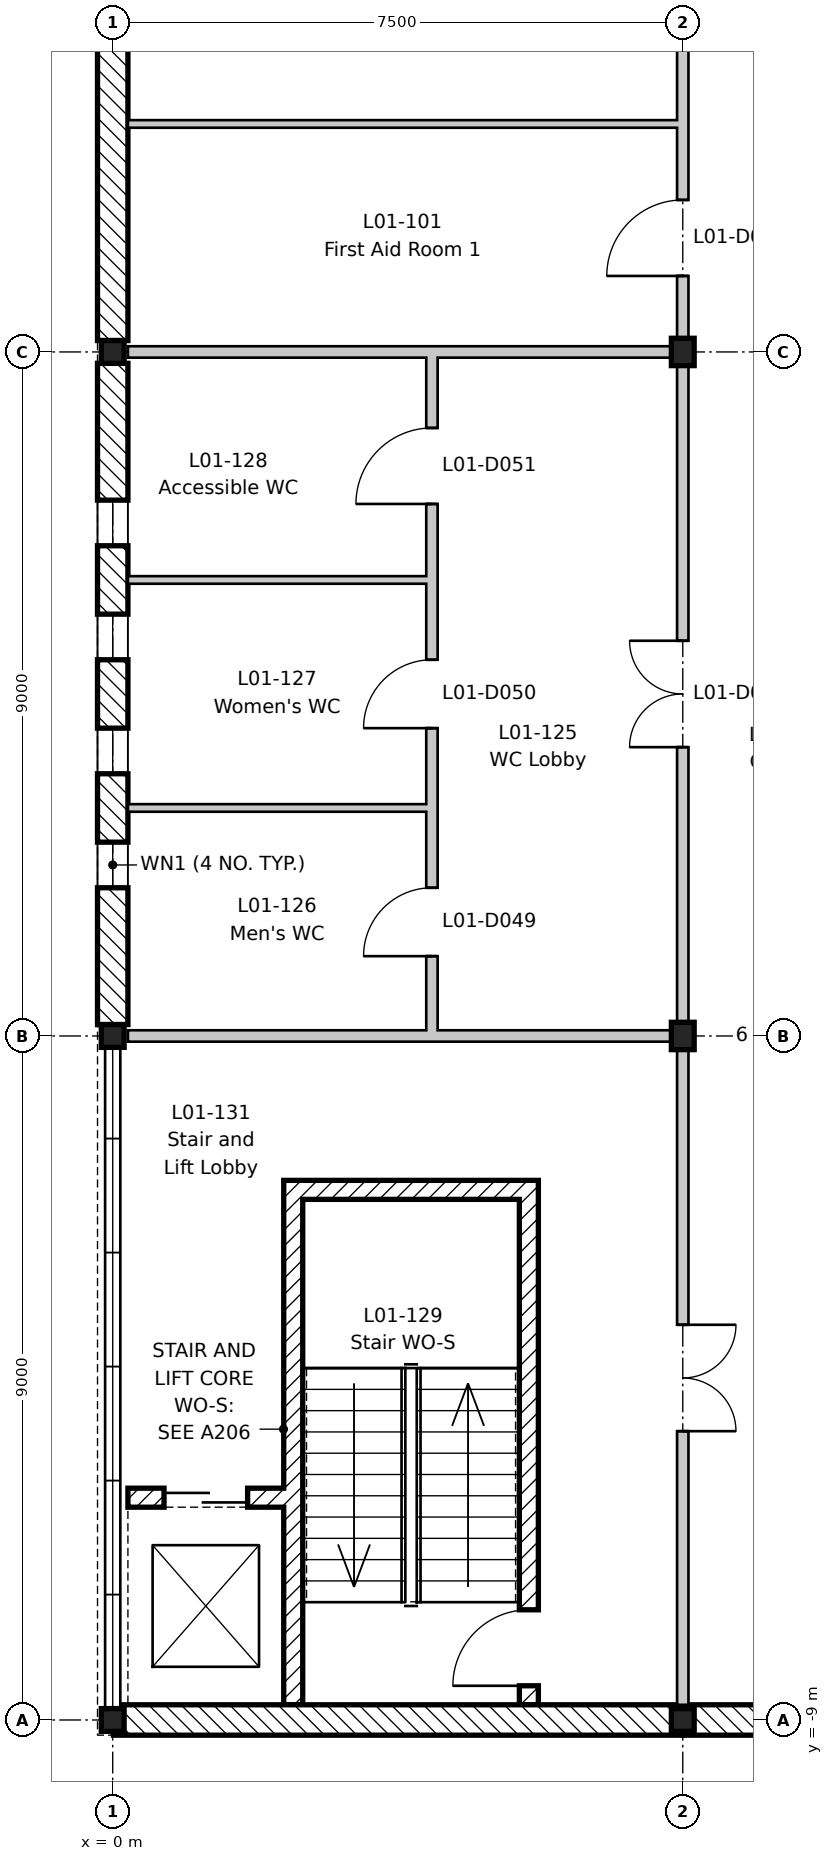
"""IFC4 building model, lengths in metres.
Left out: names, types, materials, properties, quantities, classifications, styles, units other than length and angle.
Written with IfcOpenShell. Run it as: python <this file> out.ifc"""

import sys

from ifc_helpers import new_model, si_unit, direction, frame, frame_2d, origin, origin_2d, place, context, subcontext, project, spatial, rectangle, i_section, extrude, element, fill, save


model = new_model("IFC4")
c1 = context("Model", 3, precision=1e-05, world=origin(), true_north=direction((0.0, 1.0)))
c2 = subcontext(c1, "Body", "Model", "MODEL_VIEW")
j1 = project(units=[si_unit("LENGTHUNIT", "METRE"), si_unit("PLANEANGLEUNIT", "RADIAN")], contexts=[c1])
p1 = place(None, origin())
s1 = spatial("IfcSite", under=j1, at=p1, CompositionType="ELEMENT")
p2 = place(p1, origin())
s2 = spatial("IfcBuilding", under=s1, at=p2, CompositionType="ELEMENT")
p3 = place(p2, frame((0.0, 0.0, 5.4)))
s3 = spatial("IfcBuildingStorey", under=s2, at=p3, CompositionType="ELEMENT", Elevation=5.4)
for number, where, z_axis, x_axis in (
    (1, (0.0, -9.0, -0.2), (0.0, 0.0, 1.0), (1.0, 0.0, 0.0)),
    (2, (0.0, 0.0, -0.2), (0.0, 0.0, 1.0), (1.0, 0.0, 0.0)),
    (3, (0.0, 9.0, -0.2), (0.0, 0.0, 1.0), (1.0, 0.0, 0.0)),
    (4, (7.5, -9.0, -0.2), (0.0, 0.0, 1.0), (1.0, 0.0, 0.0)),
):
    element("IfcColumn", number, at=place(p3, frame(where, z_axis=z_axis, x_axis=x_axis)), inside=s3, PredefinedType="COLUMN", context=c2, shape_type="SweptSolid", body=[
        extrude(i_section(OverallWidth=0.3, OverallDepth=0.3, WebThickness=0.011, FlangeThickness=0.019, FilletRadius=0.027, at=origin_2d()), origin(), (0.0, 0.0, 1.0), 4.5),
    ])
for number, where, z_axis, x_axis in (
    (5, (7.5, 0.0, -0.2), (0.0, 0.0, 1.0), (1.0, 0.0, 0.0)),
    (6, (7.5, 9.0, -0.2), (0.0, 0.0, 1.0), (1.0, 0.0, 0.0)),
):
    element("IfcColumn", number, at=place(p3, frame(where, z_axis=z_axis, x_axis=x_axis)), inside=s3, PredefinedType="COLUMN", context=c2, shape_type="SweptSolid", body=[
        extrude(i_section(OverallWidth=0.3, OverallDepth=0.36, WebThickness=0.012, FlangeThickness=0.022, FilletRadius=0.027, at=origin_2d()), origin(), (0.0, 0.0, 1.0), 4.5),
    ])
p4 = place(p3, frame((2.375, -8.8, 0.0), z_axis=(0.0, 0.0, 1.0), x_axis=(0.0, 1.0, 0.0)))
e7 = element("IfcWall", 7, at=p4, inside=s3, PredefinedType="SHEAR", context=c2, shape_type="SweptSolid", body=[
    extrude(rectangle(XDim=6.9, YDim=0.25, at=frame_2d((3.45, 0.0))), origin(), (0.0, 0.0, 1.0), 4.3),
])
p5 = place(p3, frame((5.475, -8.8, 0.0), z_axis=(0.0, 0.0, 1.0), x_axis=(0.0, 1.0, 0.0)))
e8 = element("IfcWall", 8, at=p5, inside=s3, PredefinedType="SHEAR", context=c2, shape_type="SweptSolid", body=[
    extrude(rectangle(XDim=6.9, YDim=0.25, at=frame_2d((3.45, 0.0))), origin(), (0.0, 0.0, 1.0), 4.3),
])
p6 = place(p5, frame((0.25, 0.0, 0.0)))
e9 = element("IfcOpeningElement", 9, at=p6, cuts=e8, PredefinedType="OPENING", context=c2, shape_type="SweptSolid", body=[
    extrude(rectangle(XDim=1.0, YDim=2.1, at=frame_2d((0.5, 1.05))), frame((0.0, 0.135, 0.0), z_axis=(0.0, -1.0, 0.0), x_axis=(1.0, 0.0, 0.0)), (0.0, 0.0, 1.0), 0.27),
])
p7 = place(p3, frame((2.5, -2.025, 0.0), z_axis=(0.0, 0.0, 1.0), x_axis=(1.0, 0.0, 0.0)))
e10 = element("IfcWall", 10, at=p7, inside=s3, PredefinedType="SHEAR", context=c2, shape_type="SweptSolid", body=[
    extrude(rectangle(XDim=2.85, YDim=0.25, at=frame_2d((1.425, 0.0))), origin(), (0.0, 0.0, 1.0), 4.3),
])
p8 = place(p3, frame((0.2, -6.075, 0.0), z_axis=(0.0, 0.0, 1.0), x_axis=(1.0, 0.0, 0.0)))
e11 = element("IfcWall", 11, at=p8, inside=s3, PredefinedType="SHEAR", context=c2, shape_type="SweptSolid", body=[
    extrude(rectangle(XDim=2.05, YDim=0.25, at=frame_2d((1.025, 0.0))), origin(), (0.0, 0.0, 1.0), 4.3),
])
p9 = place(p8, frame((0.475, 0.0, 0.0)))
e12 = element("IfcOpeningElement", 12, at=p9, cuts=e11, PredefinedType="OPENING", context=c2, shape_type="SweptSolid", body=[
    extrude(rectangle(XDim=1.1, YDim=2.1, at=frame_2d((0.55, 1.05))), frame((0.0, 0.135, 0.0), z_axis=(0.0, -1.0, 0.0), x_axis=(1.0, 0.0, 0.0)), (0.0, 0.0, 1.0), 0.27),
])
p10 = place(p3, frame((0.0, 0.15, 0.0), z_axis=(0.0, 0.0, 1.0), x_axis=(0.0, 1.0, 0.0)))
e13 = element("IfcWall", 13, at=p10, inside=s3, PredefinedType="STANDARD", context=c2, shape_type="SweptSolid", body=[
    extrude(rectangle(XDim=8.7, YDim=0.4, at=frame_2d((4.35, 0.0))), origin(), (0.0, 0.0, 1.0), 3.9),
])
p11 = place(p10, frame((1.8, 0.0, 1.5)))
e14 = element("IfcOpeningElement", 14, at=p11, cuts=e13, PredefinedType="OPENING", context=c2, shape_type="SweptSolid", body=[
    extrude(rectangle(XDim=0.6, YDim=1.2, at=frame_2d((0.3, 0.6))), frame((0.0, 0.21, 0.0), z_axis=(0.0, -1.0, 0.0), x_axis=(1.0, 0.0, 0.0)), (0.0, 0.0, 1.0), 0.42),
])
p12 = place(p10, frame((3.3, 0.0, 1.5)))
e15 = element("IfcOpeningElement", 15, at=p12, cuts=e13, PredefinedType="OPENING", context=c2, shape_type="SweptSolid", body=[
    extrude(rectangle(XDim=0.6, YDim=1.2, at=frame_2d((0.3, 0.6))), frame((0.0, 0.21, 0.0), z_axis=(0.0, -1.0, 0.0), x_axis=(1.0, 0.0, 0.0)), (0.0, 0.0, 1.0), 0.42),
])
p13 = place(p10, frame((4.8, 0.0, 1.5)))
e16 = element("IfcOpeningElement", 16, at=p13, cuts=e13, PredefinedType="OPENING", context=c2, shape_type="SweptSolid", body=[
    extrude(rectangle(XDim=0.6, YDim=1.2, at=frame_2d((0.3, 0.6))), frame((0.0, 0.21, 0.0), z_axis=(0.0, -1.0, 0.0), x_axis=(1.0, 0.0, 0.0)), (0.0, 0.0, 1.0), 0.42),
])
p14 = place(p10, frame((6.3, 0.0, 1.5)))
e17 = element("IfcOpeningElement", 17, at=p14, cuts=e13, PredefinedType="OPENING", context=c2, shape_type="SweptSolid", body=[
    extrude(rectangle(XDim=0.6, YDim=1.2, at=frame_2d((0.3, 0.6))), frame((0.0, 0.21, 0.0), z_axis=(0.0, -1.0, 0.0), x_axis=(1.0, 0.0, 0.0)), (0.0, 0.0, 1.0), 0.42),
])
p15 = place(p3, frame((0.0, 9.15, 0.0), z_axis=(0.0, 0.0, 1.0), x_axis=(0.0, 1.0, 0.0)))
e18 = element("IfcWall", 18, at=p15, inside=s3, PredefinedType="STANDARD", context=c2, shape_type="SweptSolid", body=[
    extrude(rectangle(XDim=8.7, YDim=0.4, at=frame_2d((4.35, 0.0))), origin(), (0.0, 0.0, 1.0), 3.9),
])
p16 = place(p3, frame((7.49, -9.0, 0.0), z_axis=(0.0, 0.0, 1.0), x_axis=(-1.0, 0.0, 0.0)))
e19 = element("IfcWall", 19, at=p16, inside=s3, PredefinedType="STANDARD", context=c2, shape_type="SweptSolid", body=[
    extrude(rectangle(XDim=7.479, YDim=0.4, at=frame_2d((3.74, 0.0))), origin(), (0.0, 0.0, 1.0), 3.97),
])
p17 = place(p3, frame((10.49, -9.0, 0.0), z_axis=(0.0, 0.0, 1.0), x_axis=(-1.0, 0.0, 0.0)))
e20 = element("IfcWall", 20, at=p17, inside=s3, PredefinedType="STANDARD", context=c2, shape_type="SweptSolid", body=[
    extrude(rectangle(XDim=2.979, YDim=0.4, at=frame_2d((1.49, 0.0))), origin(), (0.0, 0.0, 1.0), 4.1),
])
p18 = place(p3, frame((0.2, 9.0, 0.0), z_axis=(0.0, 0.0, 1.0), x_axis=(1.0, 0.0, 0.0)))
e21 = element("IfcWall", 21, at=p18, inside=s3, PredefinedType="PARTITIONING", context=c2, shape_type="SweptSolid", body=[
    extrude(rectangle(XDim=7.225, YDim=0.15, at=frame_2d((3.613, 0.0))), origin(), (0.0, 0.0, 1.0), 3.95),
])
p19 = place(p3, frame((0.2, 12.0, 0.0), z_axis=(0.0, 0.0, 1.0), x_axis=(1.0, 0.0, 0.0)))
e22 = element("IfcWall", 22, at=p19, inside=s3, PredefinedType="PARTITIONING", context=c2, shape_type="SweptSolid", body=[
    extrude(rectangle(XDim=7.225, YDim=0.1, at=frame_2d((3.613, 0.0))), origin(), (0.0, 0.0, 1.0), 4.3),
])
p20 = place(p3, frame((0.2, 0.0, 0.0), z_axis=(0.0, 0.0, 1.0), x_axis=(1.0, 0.0, 0.0)))
e23 = element("IfcWall", 23, at=p20, inside=s3, PredefinedType="PARTITIONING", context=c2, shape_type="SweptSolid", body=[
    extrude(rectangle(XDim=7.225, YDim=0.15, at=frame_2d((3.613, 0.0))), origin(), (0.0, 0.0, 1.0), 3.95),
])
p21 = place(p3, frame((7.5, -8.8, 0.0), z_axis=(0.0, 0.0, 1.0), x_axis=(0.0, 1.0, 0.0)))
e24 = element("IfcWall", 24, at=p21, inside=s3, PredefinedType="PARTITIONING", context=c2, shape_type="SweptSolid", body=[
    extrude(rectangle(XDim=79.3, YDim=0.15, at=frame_2d((39.65, 0.0))), origin(), (0.0, 0.0, 1.0), 3.78),
])
p22 = place(p21, frame((18.8, 0.0, 0.0)))
e25 = element("IfcOpeningElement", 25, at=p22, cuts=e24, PredefinedType="OPENING", context=c2, shape_type="SweptSolid", body=[
    extrude(rectangle(XDim=1.0, YDim=2.1, at=frame_2d((0.5, 1.05))), frame((0.0, 0.085, 0.0), z_axis=(0.0, -1.0, 0.0), x_axis=(1.0, 0.0, 0.0)), (0.0, 0.0, 1.0), 0.17),
])
p23 = place(p21, frame((23.3, 0.0, 0.0)))
e26 = element("IfcOpeningElement", 26, at=p23, cuts=e24, PredefinedType="OPENING", context=c2, shape_type="SweptSolid", body=[
    extrude(rectangle(XDim=1.0, YDim=2.1, at=frame_2d((0.5, 1.05))), frame((0.0, 0.085, 0.0), z_axis=(0.0, -1.0, 0.0), x_axis=(1.0, 0.0, 0.0)), (0.0, 0.0, 1.0), 0.17),
])
p24 = place(p21, frame((30.6, 0.0, 0.0)))
e27 = element("IfcOpeningElement", 27, at=p24, cuts=e24, PredefinedType="OPENING", context=c2, shape_type="SweptSolid", body=[
    extrude(rectangle(XDim=1.4, YDim=2.1, at=frame_2d((0.7, 1.05))), frame((0.0, 0.085, 0.0), z_axis=(0.0, -1.0, 0.0), x_axis=(1.0, 0.0, 0.0)), (0.0, 0.0, 1.0), 0.17),
])
p25 = place(p21, frame((45.8, 0.0, 0.0)))
e28 = element("IfcOpeningElement", 28, at=p25, cuts=e24, PredefinedType="OPENING", context=c2, shape_type="SweptSolid", body=[
    extrude(rectangle(XDim=1.0, YDim=2.1, at=frame_2d((0.5, 1.05))), frame((0.0, 0.085, 0.0), z_axis=(0.0, -1.0, 0.0), x_axis=(1.0, 0.0, 0.0)), (0.0, 0.0, 1.0), 0.17),
])
p26 = place(p21, frame((48.8, 0.0, 0.0)))
e29 = element("IfcOpeningElement", 29, at=p26, cuts=e24, PredefinedType="OPENING", context=c2, shape_type="SweptSolid", body=[
    extrude(rectangle(XDim=1.0, YDim=2.1, at=frame_2d((0.5, 1.05))), frame((0.0, 0.085, 0.0), z_axis=(0.0, -1.0, 0.0), x_axis=(1.0, 0.0, 0.0)), (0.0, 0.0, 1.0), 0.17),
])
p27 = place(p21, frame((51.8, 0.0, 0.0)))
e30 = element("IfcOpeningElement", 30, at=p27, cuts=e24, PredefinedType="OPENING", context=c2, shape_type="SweptSolid", body=[
    extrude(rectangle(XDim=1.0, YDim=2.1, at=frame_2d((0.5, 1.05))), frame((0.0, 0.085, 0.0), z_axis=(0.0, -1.0, 0.0), x_axis=(1.0, 0.0, 0.0)), (0.0, 0.0, 1.0), 0.17),
])
p28 = place(p21, frame((54.8, 0.0, 0.0)))
e31 = element("IfcOpeningElement", 31, at=p28, cuts=e24, PredefinedType="OPENING", context=c2, shape_type="SweptSolid", body=[
    extrude(rectangle(XDim=1.0, YDim=2.1, at=frame_2d((0.5, 1.05))), frame((0.0, 0.085, 0.0), z_axis=(0.0, -1.0, 0.0), x_axis=(1.0, 0.0, 0.0)), (0.0, 0.0, 1.0), 0.17),
])
p29 = place(p21, frame((59.3, 0.0, 0.0)))
e32 = element("IfcOpeningElement", 32, at=p29, cuts=e24, PredefinedType="OPENING", context=c2, shape_type="SweptSolid", body=[
    extrude(rectangle(XDim=1.0, YDim=2.1, at=frame_2d((0.5, 1.05))), frame((0.0, 0.085, 0.0), z_axis=(0.0, -1.0, 0.0), x_axis=(1.0, 0.0, 0.0)), (0.0, 0.0, 1.0), 0.17),
])
p30 = place(p21, frame((12.6, 0.0, 0.0)))
e33 = element("IfcOpeningElement", 33, at=p30, cuts=e24, PredefinedType="OPENING", context=c2, shape_type="SweptSolid", body=[
    extrude(rectangle(XDim=1.4, YDim=2.1, at=frame_2d((0.7, 1.05))), frame((0.0, 0.085, 0.0), z_axis=(0.0, -1.0, 0.0), x_axis=(1.0, 0.0, 0.0)), (0.0, 0.0, 1.0), 0.17),
])
p31 = place(p21, frame((3.6, 0.0, 0.0)))
e34 = element("IfcOpeningElement", 34, at=p31, cuts=e24, PredefinedType="OPENING", context=c2, shape_type="SweptSolid", body=[
    extrude(rectangle(XDim=1.4, YDim=2.1, at=frame_2d((0.7, 1.05))), frame((0.0, 0.085, 0.0), z_axis=(0.0, -1.0, 0.0), x_axis=(1.0, 0.0, 0.0)), (0.0, 0.0, 1.0), 0.17),
])
p32 = place(p21, frame((63.55, 0.0, 0.0)))
e35 = element("IfcOpeningElement", 35, at=p32, cuts=e24, PredefinedType="OPENING", context=c2, shape_type="SweptSolid", body=[
    extrude(rectangle(XDim=1.4, YDim=2.1, at=frame_2d((0.7, 1.05))), frame((0.0, 0.085, 0.0), z_axis=(0.0, -1.0, 0.0), x_axis=(1.0, 0.0, 0.0)), (0.0, 0.0, 1.0), 0.17),
])
p33 = place(p21, frame((69.6, 0.0, 0.0)))
e36 = element("IfcOpeningElement", 36, at=p33, cuts=e24, PredefinedType="OPENING", context=c2, shape_type="SweptSolid", body=[
    extrude(rectangle(XDim=1.4, YDim=2.1, at=frame_2d((0.7, 1.05))), frame((0.0, 0.085, 0.0), z_axis=(0.0, -1.0, 0.0), x_axis=(1.0, 0.0, 0.0)), (0.0, 0.0, 1.0), 0.17),
])
p34 = place(p21, frame((42.85, 0.0, 0.0)))
e37 = element("IfcOpeningElement", 37, at=p34, cuts=e24, PredefinedType="OPENING", context=c2, shape_type="SweptSolid", body=[
    extrude(rectangle(XDim=1.0, YDim=2.1, at=frame_2d((0.5, 1.05))), frame((0.0, 0.085, 0.0), z_axis=(0.0, -1.0, 0.0), x_axis=(1.0, 0.0, 0.0)), (0.0, 0.0, 1.0), 0.17),
])
p35 = place(p21, frame((36.55, 0.0, 0.0)))
e38 = element("IfcOpeningElement", 38, at=p35, cuts=e24, PredefinedType="OPENING", context=c2, shape_type="SweptSolid", body=[
    extrude(rectangle(XDim=1.4, YDim=2.1, at=frame_2d((0.7, 1.05))), frame((0.0, 0.085, 0.0), z_axis=(0.0, -1.0, 0.0), x_axis=(1.0, 0.0, 0.0)), (0.0, 0.0, 1.0), 0.17),
])
p36 = place(p21, frame((72.8, 0.0, 0.0)))
e39 = element("IfcOpeningElement", 39, at=p36, cuts=e24, PredefinedType="OPENING", context=c2, shape_type="SweptSolid", body=[
    extrude(rectangle(XDim=1.0, YDim=2.1, at=frame_2d((0.5, 1.05))), frame((0.0, 0.085, 0.0), z_axis=(0.0, -1.0, 0.0), x_axis=(1.0, 0.0, 0.0)), (0.0, 0.0, 1.0), 0.17),
])
p37 = place(p3, frame((4.2, 0.075, 0.0), z_axis=(0.0, 0.0, 1.0), x_axis=(0.0, 1.0, 0.0)))
e40 = element("IfcWall", 40, at=p37, inside=s3, PredefinedType="PARTITIONING", context=c2, shape_type="SweptSolid", body=[
    extrude(rectangle(XDim=8.85, YDim=0.15, at=frame_2d((4.425, 0.0))), origin(), (0.0, 0.0, 1.0), 4.3),
])
p38 = place(p37, frame((0.975, 0.0, 0.0)))
e41 = element("IfcOpeningElement", 41, at=p38, cuts=e40, PredefinedType="OPENING", context=c2, shape_type="SweptSolid", body=[
    extrude(rectangle(XDim=0.9, YDim=2.1, at=frame_2d((0.45, 1.05))), frame((0.0, 0.085, 0.0), z_axis=(0.0, -1.0, 0.0), x_axis=(1.0, 0.0, 0.0)), (0.0, 0.0, 1.0), 0.17),
])
p39 = place(p37, frame((3.975, 0.0, 0.0)))
e42 = element("IfcOpeningElement", 42, at=p39, cuts=e40, PredefinedType="OPENING", context=c2, shape_type="SweptSolid", body=[
    extrude(rectangle(XDim=0.9, YDim=2.1, at=frame_2d((0.45, 1.05))), frame((0.0, 0.085, 0.0), z_axis=(0.0, -1.0, 0.0), x_axis=(1.0, 0.0, 0.0)), (0.0, 0.0, 1.0), 0.17),
])
p40 = place(p37, frame((6.925, 0.0, 0.0)))
e43 = element("IfcOpeningElement", 43, at=p40, cuts=e40, PredefinedType="OPENING", context=c2, shape_type="SweptSolid", body=[
    extrude(rectangle(XDim=1.0, YDim=2.1, at=frame_2d((0.5, 1.05))), frame((0.0, 0.085, 0.0), z_axis=(0.0, -1.0, 0.0), x_axis=(1.0, 0.0, 0.0)), (0.0, 0.0, 1.0), 0.17),
])
for number, where, z_axis, x_axis in (
    (44, (0.2, 3.0, 0.0), (0.0, 0.0, 1.0), (1.0, 0.0, 0.0)),
    (45, (0.2, 6.0, 0.0), (0.0, 0.0, 1.0), (1.0, 0.0, 0.0)),
):
    element("IfcWall", number, at=place(p3, frame(where, z_axis=z_axis, x_axis=x_axis)), inside=s3, PredefinedType="PARTITIONING", context=c2, shape_type="SweptSolid", body=[
        extrude(rectangle(XDim=3.925, YDim=0.1, at=frame_2d((1.962, 0.0))), origin(), (0.0, 0.0, 1.0), 4.3),
    ])
p41 = place(p11, origin())
e46 = element("IfcWindow", 46, at=p41, inside=s3, PartitioningType="SINGLE_PANEL", PredefinedType="WINDOW", context=c2, shape_type="SweptSolid", body=[
    extrude(rectangle(XDim=0.6, YDim=1.2, at=frame_2d((0.3, 0.6))), frame((0.0, 0.03, 0.0), z_axis=(0.0, -1.0, 0.0), x_axis=(1.0, 0.0, 0.0)), (0.0, 0.0, 1.0), 0.06),
])
fill(e14, e46)
p42 = place(p12, origin())
e47 = element("IfcWindow", 47, at=p42, inside=s3, PartitioningType="SINGLE_PANEL", PredefinedType="WINDOW", context=c2, shape_type="SweptSolid", body=[
    extrude(rectangle(XDim=0.6, YDim=1.2, at=frame_2d((0.3, 0.6))), frame((0.0, 0.03, 0.0), z_axis=(0.0, -1.0, 0.0), x_axis=(1.0, 0.0, 0.0)), (0.0, 0.0, 1.0), 0.06),
])
fill(e15, e47)
p43 = place(p13, origin())
e48 = element("IfcWindow", 48, at=p43, inside=s3, PartitioningType="SINGLE_PANEL", PredefinedType="WINDOW", context=c2, shape_type="SweptSolid", body=[
    extrude(rectangle(XDim=0.6, YDim=1.2, at=frame_2d((0.3, 0.6))), frame((0.0, 0.03, 0.0), z_axis=(0.0, -1.0, 0.0), x_axis=(1.0, 0.0, 0.0)), (0.0, 0.0, 1.0), 0.06),
])
fill(e16, e48)
p44 = place(p14, origin())
e49 = element("IfcWindow", 49, at=p44, inside=s3, PartitioningType="SINGLE_PANEL", PredefinedType="WINDOW", context=c2, shape_type="SweptSolid", body=[
    extrude(rectangle(XDim=0.6, YDim=1.2, at=frame_2d((0.3, 0.6))), frame((0.0, 0.03, 0.0), z_axis=(0.0, -1.0, 0.0), x_axis=(1.0, 0.0, 0.0)), (0.0, 0.0, 1.0), 0.06),
])
fill(e17, e49)
p45 = place(p22, origin())
e50 = element("IfcDoor", 50, at=p45, inside=s3, OperationType="SINGLE_SWING_LEFT", PredefinedType="DOOR", context=c2, shape_type="SweptSolid", body=[
    extrude(rectangle(XDim=1.0, YDim=2.1, at=frame_2d((0.5, 1.05))), frame((0.0, 0.025, 0.0), z_axis=(0.0, -1.0, 0.0), x_axis=(1.0, 0.0, 0.0)), (0.0, 0.0, 1.0), 0.05),
])
fill(e25, e50)
p46 = place(p30, origin())
e51 = element("IfcDoor", 51, at=p46, inside=s3, OperationType="DOUBLE_DOOR_SINGLE_SWING", PredefinedType="DOOR", context=c2, shape_type="SweptSolid", body=[
    extrude(rectangle(XDim=1.4, YDim=2.1, at=frame_2d((0.7, 1.05))), frame((0.0, 0.025, 0.0), z_axis=(0.0, -1.0, 0.0), x_axis=(1.0, 0.0, 0.0)), (0.0, 0.0, 1.0), 0.05),
])
fill(e33, e51)
p47 = place(p38, origin())
e52 = element("IfcDoor", 52, at=p47, inside=s3, OperationType="SINGLE_SWING_LEFT", PredefinedType="DOOR", context=c2, shape_type="SweptSolid", body=[
    extrude(rectangle(XDim=0.9, YDim=2.1, at=frame_2d((0.45, 1.05))), frame((0.0, 0.025, 0.0), z_axis=(0.0, -1.0, 0.0), x_axis=(1.0, 0.0, 0.0)), (0.0, 0.0, 1.0), 0.05),
])
fill(e41, e52)
p48 = place(p39, origin())
e53 = element("IfcDoor", 53, at=p48, inside=s3, OperationType="SINGLE_SWING_LEFT", PredefinedType="DOOR", context=c2, shape_type="SweptSolid", body=[
    extrude(rectangle(XDim=0.9, YDim=2.1, at=frame_2d((0.45, 1.05))), frame((0.0, 0.025, 0.0), z_axis=(0.0, -1.0, 0.0), x_axis=(1.0, 0.0, 0.0)), (0.0, 0.0, 1.0), 0.05),
])
fill(e42, e53)
p49 = place(p40, origin())
e54 = element("IfcDoor", 54, at=p49, inside=s3, OperationType="SINGLE_SWING_LEFT", PredefinedType="DOOR", context=c2, shape_type="SweptSolid", body=[
    extrude(rectangle(XDim=1.0, YDim=2.1, at=frame_2d((0.5, 1.05))), frame((0.0, 0.025, 0.0), z_axis=(0.0, -1.0, 0.0), x_axis=(1.0, 0.0, 0.0)), (0.0, 0.0, 1.0), 0.05),
])
fill(e43, e54)
p50 = place(p6, origin())
e55 = element("IfcDoor", 55, at=p50, inside=s3, OperationType="SINGLE_SWING_LEFT", PredefinedType="DOOR", context=c2, shape_type="SweptSolid", body=[
    extrude(rectangle(XDim=1.0, YDim=2.1, at=frame_2d((0.5, 1.05))), frame((0.0, 0.025, 0.0), z_axis=(0.0, -1.0, 0.0), x_axis=(1.0, 0.0, 0.0)), (0.0, 0.0, 1.0), 0.05),
])
fill(e9, e55)
p51 = place(p31, frame((1.4, 0.0, 0.0), z_axis=(0.0, 0.0, 1.0), x_axis=(-1.0, 0.0, 0.0)))
e56 = element("IfcDoor", 56, at=p51, inside=s3, OperationType="DOUBLE_DOOR_SINGLE_SWING", PredefinedType="DOOR", context=c2, shape_type="SweptSolid", body=[
    extrude(rectangle(XDim=1.4, YDim=2.1, at=frame_2d((0.7, 1.05))), frame((0.0, 0.025, 0.0), z_axis=(0.0, -1.0, 0.0), x_axis=(1.0, 0.0, 0.0)), (0.0, 0.0, 1.0), 0.05),
])
fill(e34, e56)
p52 = place(p9, origin())
e57 = element("IfcDoor", 57, at=p52, inside=s3, OperationType="SLIDING_TO_LEFT", PredefinedType="DOOR", context=c2, shape_type="SweptSolid", body=[
    extrude(rectangle(XDim=1.1, YDim=2.1, at=frame_2d((0.55, 1.05))), frame((0.0, 0.025, 0.0), z_axis=(0.0, -1.0, 0.0), x_axis=(1.0, 0.0, 0.0)), (0.0, 0.0, 1.0), 0.05),
])
fill(e12, e57)
save(model, sys.argv[1])
